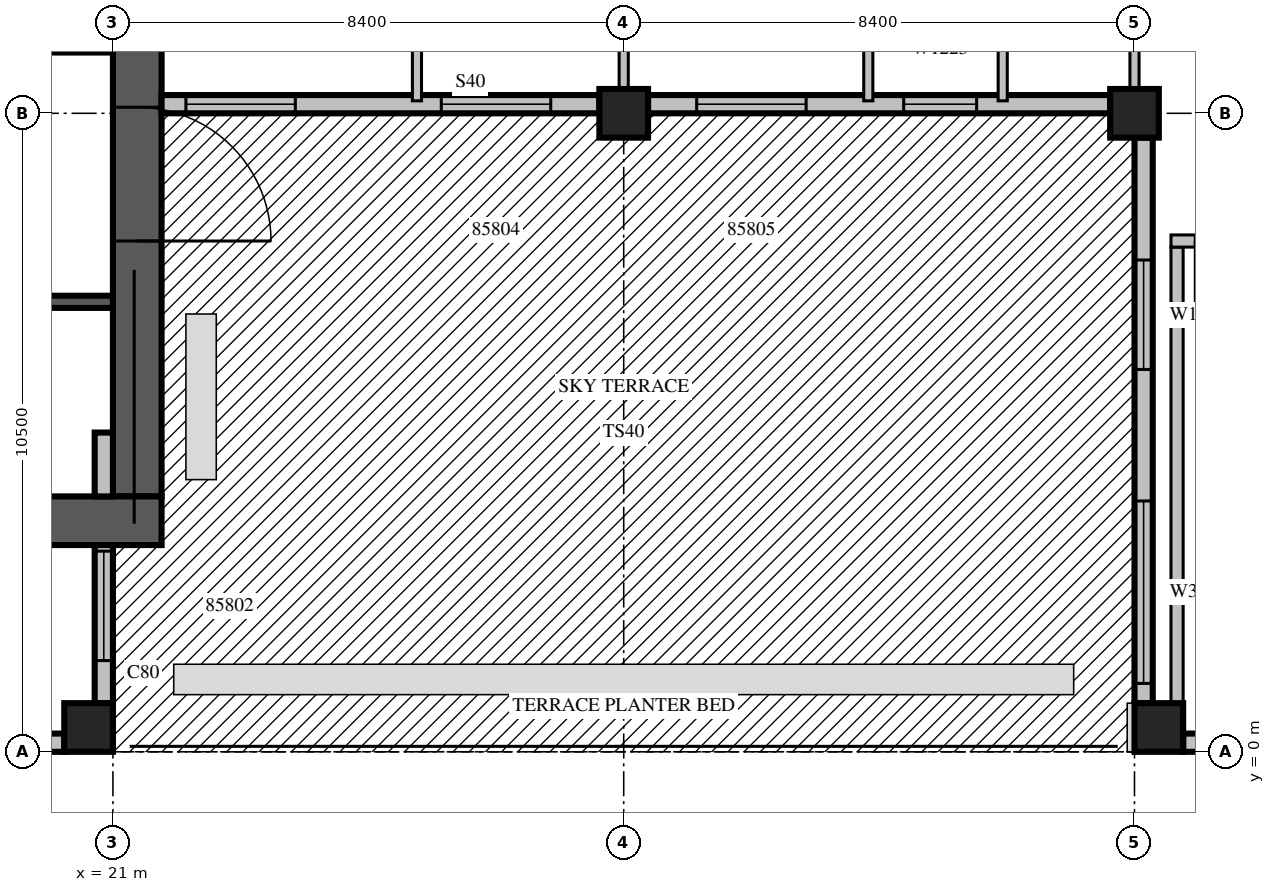
"""IFC4 building model, lengths in metres.
Left out: names, types, materials, properties, quantities, classifications, styles, units other than length and angle.
Written with IfcOpenShell. Run it as: python <this file> out.ifc"""

import sys

from ifc_helpers import new_model, si_unit, direction, frame, frame_2d, origin, origin_2d, place, context, subcontext, project, spatial, rectangle, extrude, source, transform, mapped, element, fill, save


model = new_model("IFC4")
c1 = context("Model", 3, precision=1e-05, world=origin(), true_north=direction((0.0, 1.0)))
c2 = subcontext(c1, "Body", "Model", "MODEL_VIEW")
j1 = project(units=[si_unit("LENGTHUNIT", "METRE"), si_unit("PLANEANGLEUNIT", "RADIAN")], contexts=[c1])
p1 = place(None, origin())
s1 = spatial("IfcSite", under=j1, at=p1, CompositionType="ELEMENT")
p2 = place(p1, origin())
s2 = spatial("IfcBuilding", under=s1, at=p2, CompositionType="ELEMENT")
p3 = place(p2, frame((0.0, 0.0, 253.8)))
s3 = spatial("IfcBuildingStorey", under=s2, at=p3, CompositionType="ELEMENT", Elevation=253.8)
m1 = source(origin(), c2, "Body", "SweptSolid", [
    extrude(rectangle(XDim=0.8, YDim=0.8, at=origin_2d()), origin(), (0.0, 0.0, 1.0), 3.8),
])
for number, where, z_axis, x_axis in (
    (1, (20.6, 0.4, 0.0), (0.0, 0.0, 1.0), (1.0, 0.0, 0.0)),
    (2, (38.2, 0.4, 0.0), (0.0, 0.0, 1.0), (1.0, 0.0, 0.0)),
    (3, (29.4, 10.5, 0.0), (0.0, 0.0, 1.0), (1.0, 0.0, 0.0)),
    (4, (37.8, 10.5, 0.0), (0.0, 0.0, 1.0), (1.0, 0.0, 0.0)),
):
    element("IfcColumn", number, at=place(p3, frame(where, z_axis=z_axis, x_axis=x_axis)), inside=s3, PredefinedType="COLUMN", context=c2, shape_type="MappedRepresentation", body=[
        mapped(m1, transform((0.0, 0.0, 0.0), scale=1.0)),
    ])
m2 = source(origin(), c2, "Body", "SweptSolid", [
    extrude(rectangle(XDim=16.8, YDim=0.8, at=frame_2d((8.4, 0.0))), origin(), (0.0, 0.0, 1.0), 3.8),
])
p4 = place(p3, frame((21.4, 4.2, 0.0), z_axis=(0.0, 0.0, 1.0), x_axis=(0.0, 1.0, 0.0)))
e5 = element("IfcWall", 5, at=p4, inside=s3, PredefinedType="SHEAR", context=c2, shape_type="MappedRepresentation", body=[
    mapped(m2, transform((0.0, 0.0, 0.0), scale=1.0)),
])
m3 = source(origin(), c2, "Body", "SweptSolid", [
    extrude(rectangle(XDim=2.2, YDim=2.1, at=frame_2d((1.1, 1.05))), frame((0.0, 0.41, 0.0), z_axis=(0.0, -1.0, 0.0), x_axis=(1.0, 0.0, 0.0)), (0.0, 0.0, 1.0), 0.82),
])
p5 = place(p4, frame((4.2, 0.0, 0.0)))
e6 = element("IfcOpeningElement", 6, at=p5, cuts=e5, PredefinedType="OPENING", context=c2, shape_type="MappedRepresentation", body=[
    mapped(m3, transform((0.0, 0.0, 0.0), scale=1.0)),
])
m4 = source(origin(), c2, "Body", "SweptSolid", [
    extrude(rectangle(XDim=1.2, YDim=2.1, at=frame_2d((0.6, 1.05))), frame((0.0, 0.41, 0.0), z_axis=(0.0, -1.0, 0.0), x_axis=(1.0, 0.0, 0.0)), (0.0, 0.0, 1.0), 0.82),
])
p6 = place(p4, frame((14.7, 0.0, 0.0)))
e7 = element("IfcOpeningElement", 7, at=p6, cuts=e5, PredefinedType="OPENING", context=c2, shape_type="MappedRepresentation", body=[
    mapped(m4, transform((0.0, 0.0, 0.0), scale=1.0)),
])
m5 = source(origin(), c2, "Body", "SweptSolid", [
    extrude(rectangle(XDim=17.6, YDim=0.8, at=frame_2d((8.8, 0.0))), origin(), (0.0, 0.0, 1.0), 3.8),
])
p7 = place(p3, frame((4.2, 3.8, 0.0), z_axis=(0.0, 0.0, 1.0), x_axis=(1.0, 0.0, 0.0)))
e8 = element("IfcWall", 8, at=p7, inside=s3, PredefinedType="SHEAR", context=c2, shape_type="MappedRepresentation", body=[
    mapped(m5, transform((0.0, 0.0, 0.0), scale=1.0)),
])
m6 = source(origin(), c2, "Body", "SweptSolid", [
    extrude(rectangle(XDim=0.9, YDim=2.1, at=frame_2d((0.45, 1.05))), frame((0.0, 0.41, 0.0), z_axis=(0.0, -1.0, 0.0), x_axis=(1.0, 0.0, 0.0)), (0.0, 0.0, 1.0), 0.82),
])
p8 = place(p7, frame((11.55, 0.0, 0.0)))
e9 = element("IfcOpeningElement", 9, at=p8, cuts=e8, PredefinedType="OPENING", context=c2, shape_type="MappedRepresentation", body=[
    mapped(m6, transform((0.0, 0.0, 0.0), scale=1.0)),
])
m7 = source(origin(), c2, "Body", "SweptSolid", [
    extrude(rectangle(XDim=9.3, YDim=0.3, at=frame_2d((4.65, 0.0))), origin(), (0.0, 0.0, 1.0), 3.4),
])
p9 = place(p3, frame((10.9, 0.15, 0.0), z_axis=(0.0, 0.0, 1.0), x_axis=(1.0, 0.0, 0.0)))
e10 = element("IfcWall", 10, at=p9, inside=s3, PredefinedType="STANDARD", context=c2, shape_type="MappedRepresentation", body=[
    mapped(m7, transform((0.0, 0.0, 0.0), scale=1.0)),
])
m8 = source(origin(), c2, "Body", "SweptSolid", [
    extrude(rectangle(XDim=3.0, YDim=2.3, at=frame_2d((1.5, 1.15))), frame((0.0, 0.16, 0.0), z_axis=(0.0, -1.0, 0.0), x_axis=(1.0, 0.0, 0.0)), (0.0, 0.0, 1.0), 0.32),
])
p10 = place(p9, frame((5.975, 0.0, 0.6)))
e11 = element("IfcOpeningElement", 11, at=p10, cuts=e10, PredefinedType="OPENING", context=c2, shape_type="MappedRepresentation", body=[
    mapped(m8, transform((0.0, 0.0, 0.0), scale=1.0)),
])
m9 = source(origin(), c2, "Body", "SweptSolid", [
    extrude(rectangle(XDim=1.0, YDim=2.1, at=frame_2d((0.5, 1.05))), frame((0.0, 0.16, 0.0), z_axis=(0.0, -1.0, 0.0), x_axis=(1.0, 0.0, 0.0)), (0.0, 0.0, 1.0), 0.32),
])
p11 = place(p9, frame((1.725, 0.0, 0.0)))
e12 = element("IfcOpeningElement", 12, at=p11, cuts=e10, PredefinedType="OPENING", context=c2, shape_type="MappedRepresentation", body=[
    mapped(m9, transform((0.0, 0.0, 0.0), scale=1.0)),
])
m10 = source(origin(), c2, "Body", "SweptSolid", [
    extrude(rectangle(XDim=2.6, YDim=0.3, at=frame_2d((1.3, 0.0))), origin(), (0.0, 0.0, 1.0), 3.4),
])
p12 = place(p3, frame((20.85, 0.8, 0.0), z_axis=(0.0, 0.0, 1.0), x_axis=(0.0, 1.0, 0.0)))
e13 = element("IfcWall", 13, at=p12, inside=s3, PredefinedType="STANDARD", context=c2, shape_type="MappedRepresentation", body=[
    mapped(m10, transform((0.0, 0.0, 0.0), scale=1.0)),
])
m11 = source(origin(), c2, "Body", "SweptSolid", [
    extrude(rectangle(XDim=1.8, YDim=2.4, at=frame_2d((0.9, 1.2))), frame((0.0, 0.16, 0.0), z_axis=(0.0, -1.0, 0.0), x_axis=(1.0, 0.0, 0.0)), (0.0, 0.0, 1.0), 0.32),
])
p13 = place(p12, frame((0.7, 0.0, 0.0)))
e14 = element("IfcOpeningElement", 14, at=p13, cuts=e13, PredefinedType="OPENING", context=c2, shape_type="MappedRepresentation", body=[
    mapped(m11, transform((0.0, 0.0, 0.0), scale=1.0)),
])
m12 = source(origin(), c2, "Body", "SweptSolid", [
    extrude(rectangle(XDim=1.05, YDim=0.3, at=frame_2d((0.525, 0.0))), origin(), (0.0, 0.0, 1.0), 3.4),
])
p14 = place(p3, frame((20.85, 4.2, 0.0), z_axis=(0.0, 0.0, 1.0), x_axis=(0.0, 1.0, 0.0)))
e15 = element("IfcWall", 15, at=p14, inside=s3, PredefinedType="STANDARD", context=c2, shape_type="MappedRepresentation", body=[
    mapped(m12, transform((0.0, 0.0, 0.0), scale=1.0)),
])
m13 = source(origin(), c2, "Body", "SweptSolid", [
    extrude(rectangle(XDim=7.2, YDim=0.3, at=frame_2d((3.6, 0.0))), origin(), (0.0, 0.0, 1.0), 3.4),
])
p15 = place(p3, frame((21.8, 10.65, 0.0), z_axis=(0.0, 0.0, 1.0), x_axis=(1.0, 0.0, 0.0)))
e16 = element("IfcWall", 16, at=p15, inside=s3, PredefinedType="STANDARD", context=c2, shape_type="MappedRepresentation", body=[
    mapped(m13, transform((0.0, 0.0, 0.0), scale=1.0)),
])
p16 = place(p15, frame((0.4, 0.0, 0.0)))
e17 = element("IfcOpeningElement", 17, at=p16, cuts=e16, PredefinedType="OPENING", context=c2, shape_type="MappedRepresentation", body=[
    mapped(m11, transform((0.0, 0.0, 0.0), scale=1.0)),
])
p17 = place(p15, frame((4.6, 0.0, 0.0)))
e18 = element("IfcOpeningElement", 18, at=p17, cuts=e16, PredefinedType="OPENING", context=c2, shape_type="MappedRepresentation", body=[
    mapped(m11, transform((0.0, 0.0, 0.0), scale=1.0)),
])
m14 = source(origin(), c2, "Body", "SweptSolid", [
    extrude(rectangle(XDim=7.6, YDim=0.3, at=frame_2d((3.8, 0.0))), origin(), (0.0, 0.0, 1.0), 3.4),
])
p18 = place(p3, frame((29.8, 10.65, 0.0), z_axis=(0.0, 0.0, 1.0), x_axis=(1.0, 0.0, 0.0)))
e19 = element("IfcWall", 19, at=p18, inside=s3, PredefinedType="STANDARD", context=c2, shape_type="MappedRepresentation", body=[
    mapped(m14, transform((0.0, 0.0, 0.0), scale=1.0)),
])
p19 = place(p18, frame((0.8, 0.0, 0.0)))
e20 = element("IfcOpeningElement", 20, at=p19, cuts=e19, PredefinedType="OPENING", context=c2, shape_type="MappedRepresentation", body=[
    mapped(m11, transform((0.0, 0.0, 0.0), scale=1.0)),
])
m15 = source(origin(), c2, "Body", "SweptSolid", [
    extrude(rectangle(XDim=1.2, YDim=2.3, at=frame_2d((0.6, 1.15))), frame((0.0, 0.16, 0.0), z_axis=(0.0, -1.0, 0.0), x_axis=(1.0, 0.0, 0.0)), (0.0, 0.0, 1.0), 0.32),
])
p20 = place(p18, frame((4.204, 0.0, 0.6)))
e21 = element("IfcOpeningElement", 21, at=p20, cuts=e19, PredefinedType="OPENING", context=c2, shape_type="MappedRepresentation", body=[
    mapped(m15, transform((0.0, 0.0, 0.0), scale=1.0)),
])
p21 = place(p3, frame((37.95, 10.1, 0.0), z_axis=(0.0, 0.0, 1.0), x_axis=(0.0, -1.0, 0.0)))
e22 = element("IfcWall", 22, at=p21, inside=s3, PredefinedType="STANDARD", context=c2, shape_type="MappedRepresentation", body=[
    mapped(m7, transform((0.0, 0.0, 0.0), scale=1.0)),
])
m16 = source(origin(), c2, "Body", "SweptSolid", [
    extrude(rectangle(XDim=1.8, YDim=2.3, at=frame_2d((0.9, 1.15))), frame((0.0, 0.16, 0.0), z_axis=(0.0, -1.0, 0.0), x_axis=(1.0, 0.0, 0.0)), (0.0, 0.0, 1.0), 0.32),
])
p22 = place(p21, frame((2.013, 0.0, 0.6)))
e23 = element("IfcOpeningElement", 23, at=p22, cuts=e22, PredefinedType="OPENING", context=c2, shape_type="MappedRepresentation", body=[
    mapped(m16, transform((0.0, 0.0, 0.0), scale=1.0)),
])
p23 = place(p21, frame((5.975, 0.0, 0.6)))
e24 = element("IfcOpeningElement", 24, at=p23, cuts=e22, PredefinedType="OPENING", context=c2, shape_type="MappedRepresentation", body=[
    mapped(m8, transform((0.0, 0.0, 0.0), scale=1.0)),
])
p24 = place(p3, frame((38.6, 0.15, 0.0), z_axis=(0.0, 0.0, 1.0), x_axis=(1.0, 0.0, 0.0)))
e25 = element("IfcWall", 25, at=p24, inside=s3, PredefinedType="STANDARD", context=c2, shape_type="SweptSolid", body=[
    extrude(rectangle(XDim=1.6, YDim=0.3, at=frame_2d((0.8, 0.0))), origin(), (0.0, 0.0, 1.0), 3.4),
])
m17 = source(origin(), c2, "Body", "SweptSolid", [
    extrude(rectangle(XDim=0.9, YDim=2.3, at=frame_2d((0.45, 1.15))), frame((0.0, 0.16, 0.0), z_axis=(0.0, -1.0, 0.0), x_axis=(1.0, 0.0, 0.0)), (0.0, 0.0, 1.0), 0.32),
])
p25 = place(p24, frame((0.35, 0.0, 0.6)))
e26 = element("IfcOpeningElement", 26, at=p25, cuts=e25, PredefinedType="OPENING", context=c2, shape_type="MappedRepresentation", body=[
    mapped(m17, transform((0.0, 0.0, 0.0), scale=1.0)),
])
m18 = source(origin(), c2, "Body", "SweptSolid", [
    extrude(rectangle(XDim=2.4, YDim=0.2, at=frame_2d((1.2, 0.0))), origin(), (0.0, 0.0, 1.0), 3.8),
])
p26 = place(p3, frame((18.6, 7.4, 0.0), z_axis=(0.0, 0.0, 1.0), x_axis=(1.0, 0.0, 0.0)))
e27 = element("IfcWall", 27, at=p26, inside=s3, PredefinedType="SOLIDWALL", context=c2, shape_type="MappedRepresentation", body=[
    mapped(m18, transform((0.0, 0.0, 0.0), scale=1.0)),
])
m19 = source(origin(), c2, "Body", "SweptSolid", [
    extrude(rectangle(XDim=8.0, YDim=0.2, at=frame_2d((4.0, 0.0))), origin(), (0.0, 0.0, 1.0), 3.4),
])
p27 = place(p3, frame((38.5, 0.3, 0.0), z_axis=(0.0, 0.0, 1.0), x_axis=(0.0, 1.0, 0.0)))
e28 = element("IfcWall", 28, at=p27, inside=s3, PredefinedType="PARTITIONING", context=c2, shape_type="MappedRepresentation", body=[
    mapped(m19, transform((0.0, 0.0, 0.0), scale=1.0)),
])
m20 = source(origin(), c2, "Body", "SweptSolid", [
    extrude(rectangle(XDim=5.45, YDim=0.2, at=frame_2d((2.725, 0.0))), origin(), (0.0, 0.0, 1.0), 3.4),
])
p28 = place(p3, frame((38.4, 8.4, 0.0), z_axis=(0.0, 0.0, 1.0), x_axis=(1.0, 0.0, 0.0)))
e29 = element("IfcWall", 29, at=p28, inside=s3, PredefinedType="PARTITIONING", context=c2, shape_type="MappedRepresentation", body=[
    mapped(m20, transform((0.0, 0.0, 0.0), scale=1.0)),
])
m21 = source(origin(), c2, "Body", "SweptSolid", [
    extrude(rectangle(XDim=1.2, YDim=2.1, at=frame_2d((0.6, 1.05))), frame((0.0, 0.11, 0.0), z_axis=(0.0, -1.0, 0.0), x_axis=(1.0, 0.0, 0.0)), (0.0, 0.0, 1.0), 0.22),
])
p29 = place(p28, frame((0.4, 0.0, 0.0)))
e30 = element("IfcOpeningElement", 30, at=p29, cuts=e29, PredefinedType="OPENING", context=c2, shape_type="MappedRepresentation", body=[
    mapped(m21, transform((0.0, 0.0, 0.0), scale=1.0)),
])
m22 = source(origin(), c2, "Body", "SweptSolid", [
    extrude(rectangle(XDim=0.9, YDim=2.1, at=frame_2d((0.45, 1.05))), frame((0.0, 0.11, 0.0), z_axis=(0.0, -1.0, 0.0), x_axis=(1.0, 0.0, 0.0)), (0.0, 0.0, 1.0), 0.22),
])
p30 = place(p28, frame((3.25, 0.0, 0.0)))
e31 = element("IfcOpeningElement", 31, at=p30, cuts=e29, PredefinedType="OPENING", context=c2, shape_type="MappedRepresentation", body=[
    mapped(m22, transform((0.0, 0.0, 0.0), scale=1.0)),
])
m23 = source(origin(), c2, "Body", "SweptSolid", [
    extrude(rectangle(XDim=4.295, YDim=0.15, at=frame_2d((2.147, 0.0))), origin(), (0.0, 0.0, 1.0), 3.4),
])
p31 = place(p3, frame((26.0, 15.0, 0.0), z_axis=(0.0, 0.0, 1.0), x_axis=(0.0, -1.0, 0.0)))
e32 = element("IfcWall", 32, at=p31, inside=s3, PredefinedType="PARTITIONING", context=c2, shape_type="MappedRepresentation", body=[
    mapped(m23, transform((0.0, 0.0, 0.0), scale=1.0)),
])
m24 = source(origin(), c2, "Body", "SweptSolid", [
    extrude(rectangle(XDim=0.9, YDim=2.1, at=frame_2d((0.45, 1.05))), frame((0.0, 0.085, 0.0), z_axis=(0.0, -1.0, 0.0), x_axis=(1.0, 0.0, 0.0)), (0.0, 0.0, 1.0), 0.17),
])
p32 = place(p31, frame((1.113, 0.0, 0.0)))
e33 = element("IfcOpeningElement", 33, at=p32, cuts=e32, PredefinedType="OPENING", context=c2, shape_type="MappedRepresentation", body=[
    mapped(m24, transform((0.0, 0.0, 0.0), scale=1.0)),
])
m25 = source(origin(), c2, "Body", "SweptSolid", [
    extrude(rectangle(XDim=4.101, YDim=0.15, at=frame_2d((2.05, 0.0))), origin(), (0.0, 0.0, 1.0), 3.4),
])
p33 = place(p3, frame((29.4, 10.899, 0.0), z_axis=(0.0, 0.0, 1.0), x_axis=(0.0, 1.0, 0.0)))
e34 = element("IfcWall", 34, at=p33, inside=s3, PredefinedType="PARTITIONING", context=c2, shape_type="MappedRepresentation", body=[
    mapped(m25, transform((0.0, 0.0, 0.0), scale=1.0)),
])
p34 = place(p3, frame((33.422, 10.705, 0.0), z_axis=(0.0, 0.0, 1.0), x_axis=(0.0, 1.0, 0.0)))
e35 = element("IfcWall", 35, at=p34, inside=s3, PredefinedType="PARTITIONING", context=c2, shape_type="MappedRepresentation", body=[
    mapped(m23, transform((0.0, 0.0, 0.0), scale=1.0)),
])
p35 = place(p3, frame((35.633, 10.705, 0.0), z_axis=(0.0, 0.0, 1.0), x_axis=(0.0, 1.0, 0.0)))
e36 = element("IfcWall", 36, at=p35, inside=s3, PredefinedType="PARTITIONING", context=c2, shape_type="MappedRepresentation", body=[
    mapped(m23, transform((0.0, 0.0, 0.0), scale=1.0)),
])
p36 = place(p35, frame((1.698, 0.0, 0.0)))
e37 = element("IfcOpeningElement", 37, at=p36, cuts=e36, PredefinedType="OPENING", context=c2, shape_type="MappedRepresentation", body=[
    mapped(m24, transform((0.0, 0.0, 0.0), scale=1.0)),
])
p37 = place(p3, frame((37.8, 10.899, 0.0), z_axis=(0.0, 0.0, 1.0), x_axis=(0.0, 1.0, 0.0)))
e38 = element("IfcWall", 38, at=p37, inside=s3, PredefinedType="PARTITIONING", context=c2, shape_type="MappedRepresentation", body=[
    mapped(m25, transform((0.0, 0.0, 0.0), scale=1.0)),
])
m26 = source(origin(), c2, "Body", "SweptSolid", [
    extrude(rectangle(XDim=1.8, YDim=2.4, at=frame_2d((0.9, 1.2))), frame((0.0, 0.025, 0.0), z_axis=(0.0, -1.0, 0.0), x_axis=(1.0, 0.0, 0.0)), (0.0, 0.0, 1.0), 0.05),
])
p38 = place(p13, origin())
e39 = element("IfcDoor", 39, at=p38, inside=s3, OperationType="SLIDING_TO_LEFT", PredefinedType="DOOR", context=c2, shape_type="MappedRepresentation", body=[
    mapped(m26, transform((0.0, 0.0, 0.0), scale=1.0)),
])
fill(e14, e39)
p39 = place(p16, origin())
e40 = element("IfcDoor", 40, at=p39, inside=s3, OperationType="SLIDING_TO_LEFT", PredefinedType="DOOR", context=c2, shape_type="MappedRepresentation", body=[
    mapped(m26, transform((0.0, 0.0, 0.0), scale=1.0)),
])
fill(e17, e40)
p40 = place(p17, origin())
e41 = element("IfcDoor", 41, at=p40, inside=s3, OperationType="SLIDING_TO_LEFT", PredefinedType="DOOR", context=c2, shape_type="MappedRepresentation", body=[
    mapped(m26, transform((0.0, 0.0, 0.0), scale=1.0)),
])
fill(e18, e41)
p41 = place(p19, origin())
e42 = element("IfcDoor", 42, at=p41, inside=s3, OperationType="SLIDING_TO_LEFT", PredefinedType="DOOR", context=c2, shape_type="MappedRepresentation", body=[
    mapped(m26, transform((0.0, 0.0, 0.0), scale=1.0)),
])
fill(e20, e42)
m27 = source(origin(), c2, "Body", "SweptSolid", [
    extrude(rectangle(XDim=1.2, YDim=2.3, at=frame_2d((0.6, 1.15))), frame((0.0, 0.03, 0.0), z_axis=(0.0, -1.0, 0.0), x_axis=(1.0, 0.0, 0.0)), (0.0, 0.0, 1.0), 0.06),
])
p42 = place(p20, origin())
e43 = element("IfcWindow", 43, at=p42, inside=s3, PartitioningType="SINGLE_PANEL", PredefinedType="WINDOW", context=c2, shape_type="MappedRepresentation", body=[
    mapped(m27, transform((0.0, 0.0, 0.0), scale=1.0)),
])
fill(e21, e43)
m28 = source(origin(), c2, "Body", "SweptSolid", [
    extrude(rectangle(XDim=1.8, YDim=2.3, at=frame_2d((0.9, 1.15))), frame((0.0, 0.03, 0.0), z_axis=(0.0, -1.0, 0.0), x_axis=(1.0, 0.0, 0.0)), (0.0, 0.0, 1.0), 0.06),
])
p43 = place(p22, origin())
e44 = element("IfcWindow", 44, at=p43, inside=s3, PartitioningType="SINGLE_PANEL", PredefinedType="WINDOW", context=c2, shape_type="MappedRepresentation", body=[
    mapped(m28, transform((0.0, 0.0, 0.0), scale=1.0)),
])
fill(e23, e44)
m29 = source(origin(), c2, "Body", "SweptSolid", [
    extrude(rectangle(XDim=3.0, YDim=2.3, at=frame_2d((1.5, 1.15))), frame((0.0, 0.03, 0.0), z_axis=(0.0, -1.0, 0.0), x_axis=(1.0, 0.0, 0.0)), (0.0, 0.0, 1.0), 0.06),
])
p44 = place(p23, origin())
e45 = element("IfcWindow", 45, at=p44, inside=s3, PartitioningType="SINGLE_PANEL", PredefinedType="WINDOW", context=c2, shape_type="MappedRepresentation", body=[
    mapped(m29, transform((0.0, 0.0, 0.0), scale=1.0)),
])
fill(e24, e45)
m30 = source(origin(), c2, "Body", "SweptSolid", [
    extrude(rectangle(XDim=2.2, YDim=2.1, at=frame_2d((1.1, 1.05))), frame((0.0, 0.025, 0.0), z_axis=(0.0, -1.0, 0.0), x_axis=(1.0, 0.0, 0.0)), (0.0, 0.0, 1.0), 0.05),
])
p45 = place(p5, origin())
e46 = element("IfcDoor", 46, at=p45, inside=s3, OperationType="DOUBLE_DOOR_SINGLE_SWING", PredefinedType="DOOR", context=c2, shape_type="MappedRepresentation", body=[
    mapped(m30, transform((0.0, 0.0, 0.0), scale=1.0)),
])
fill(e6, e46)
save(model, sys.argv[1])
